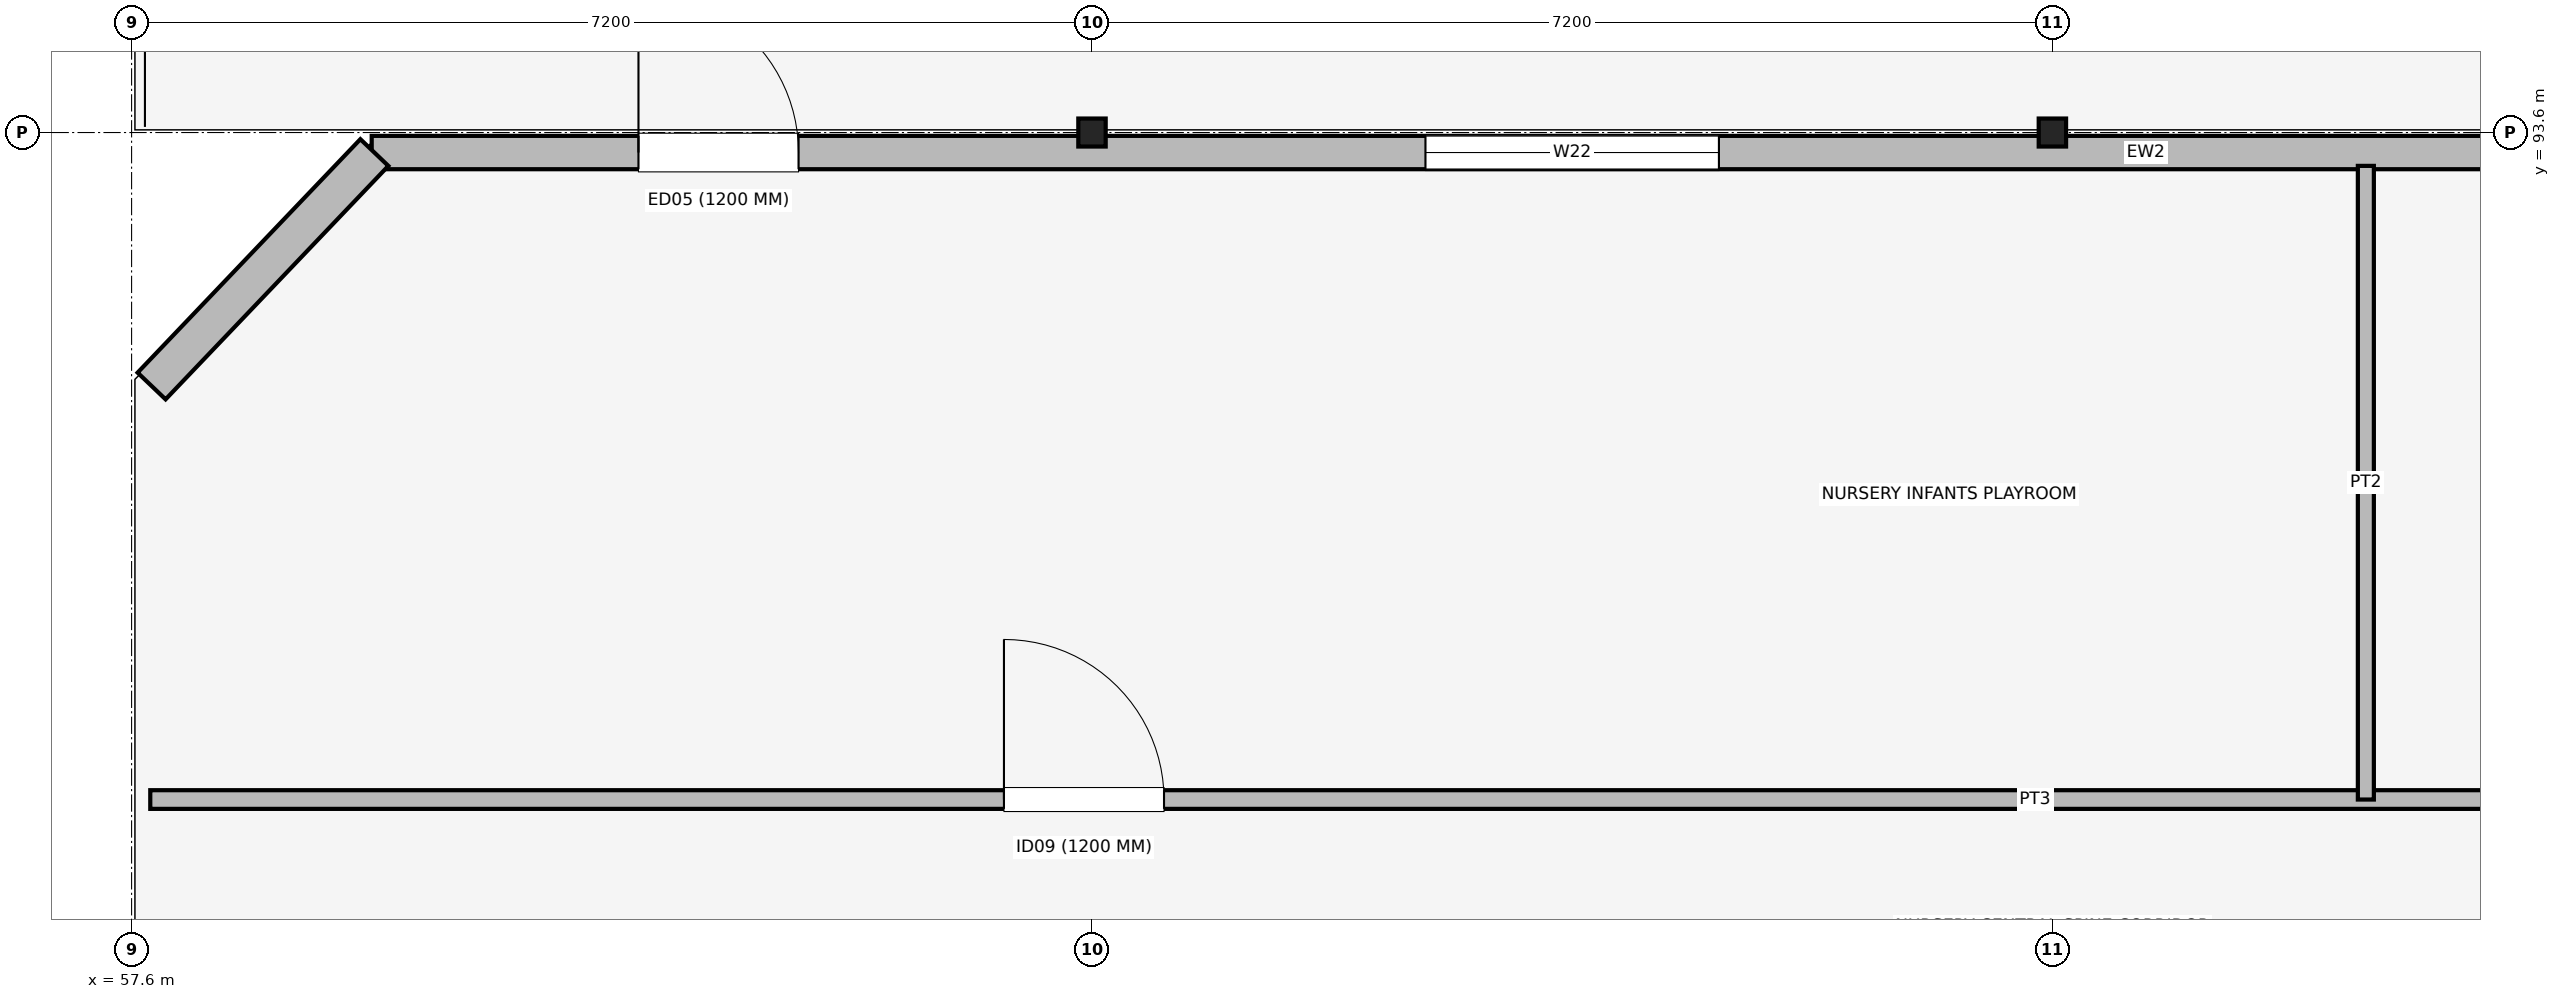
"""IFC4 building model, lengths in metres.
Left out: names, types, materials, properties, quantities, classifications, styles, units other than length and angle.
Written with IfcOpenShell. Run it as: python <this file> out.ifc"""

import sys

from ifc_helpers import new_model, si_unit, direction, frame, frame_2d, origin, origin_2d, place, context, subcontext, project, spatial, rectangle, i_section, extrude, element, fill, save


model = new_model("IFC4")
c1 = context("Model", 3, precision=1e-05, world=origin(), true_north=direction((0.0, 1.0)))
c2 = subcontext(c1, "Body", "Model", "MODEL_VIEW")
j1 = project(units=[si_unit("LENGTHUNIT", "METRE"), si_unit("PLANEANGLEUNIT", "RADIAN")], contexts=[c1])
p1 = place(None, origin())
s1 = spatial("IfcSite", under=j1, at=p1, CompositionType="ELEMENT")
p2 = place(p1, origin())
s2 = spatial("IfcBuilding", under=s1, at=p2, CompositionType="ELEMENT")
p3 = place(p2, frame((0.0, 0.0, 4.5)))
s3 = spatial("IfcBuildingStorey", under=s2, at=p3, CompositionType="ELEMENT", Elevation=4.5)
for number, where, z_axis, x_axis in (
    (1, (64.8, 93.6, 0.0), (0.0, 0.0, 1.0), (1.0, 0.0, 0.0)),
    (2, (72.0, 93.6, 0.0), (0.0, 0.0, 1.0), (1.0, 0.0, 0.0)),
):
    element("IfcColumn", number, at=place(p3, frame(where, z_axis=z_axis, x_axis=x_axis)), inside=s3, PredefinedType="COLUMN", context=c2, shape_type="SweptSolid", body=[
        extrude(i_section(OverallWidth=0.205, OverallDepth=0.21, WebThickness=0.009, FlangeThickness=0.014, FilletRadius=0.01, at=origin_2d()), origin(), (0.0, 0.0, 1.0), 4.2),
    ])
p4 = place(p3, frame((59.4, 93.45, 0.0), z_axis=(0.0, 0.0, 1.0), x_axis=(1.0, 0.0, 0.0)))
e3 = element("IfcWall", 3, at=p4, inside=s3, PredefinedType="SOLIDWALL", context=c2, shape_type="SweptSolid", body=[
    extrude(rectangle(XDim=46.8, YDim=0.25, at=frame_2d((23.4, 0.0))), origin(), (0.0, 0.0, 1.0), 3.448),
])
p5 = place(p4, frame((2.0, 0.0, 0.0)))
e4 = element("IfcOpeningElement", 4, at=p5, cuts=e3, PredefinedType="OPENING", context=c2, shape_type="SweptSolid", body=[
    extrude(rectangle(XDim=1.2, YDim=2.2, at=frame_2d((0.6, 1.1))), frame((0.0, 0.135, 0.0), z_axis=(0.0, -1.0, 0.0), x_axis=(1.0, 0.0, 0.0)), (0.0, 0.0, 1.0), 0.27),
])
p6 = place(p4, frame((7.9, 0.0, 0.65)))
e5 = element("IfcOpeningElement", 5, at=p6, cuts=e3, PredefinedType="OPENING", context=c2, shape_type="SweptSolid", body=[
    extrude(rectangle(XDim=2.2, YDim=2.05, at=frame_2d((1.1, 1.025))), frame((0.0, 0.135, 0.0), z_axis=(0.0, -1.0, 0.0), x_axis=(1.0, 0.0, 0.0)), (0.0, 0.0, 1.0), 0.27),
])
p7 = place(p4, frame((22.8, 0.0, 0.0)))
e6 = element("IfcOpeningElement", 6, at=p7, cuts=e3, PredefinedType="OPENING", context=c2, shape_type="SweptSolid", body=[
    extrude(rectangle(XDim=1.2, YDim=2.2, at=frame_2d((0.6, 1.1))), frame((0.0, 0.135, 0.0), z_axis=(0.0, -1.0, 0.0), x_axis=(1.0, 0.0, 0.0)), (0.0, 0.0, 1.0), 0.27),
])
p8 = place(p4, frame((17.0, 0.0, 0.65)))
e7 = element("IfcOpeningElement", 7, at=p8, cuts=e3, PredefinedType="OPENING", context=c2, shape_type="SweptSolid", body=[
    extrude(rectangle(XDim=2.2, YDim=2.05, at=frame_2d((1.1, 1.025))), frame((0.0, 0.135, 0.0), z_axis=(0.0, -1.0, 0.0), x_axis=(1.0, 0.0, 0.0)), (0.0, 0.0, 1.0), 0.27),
])
p9 = place(p4, frame((37.2, 0.0, 0.0)))
e8 = element("IfcOpeningElement", 8, at=p9, cuts=e3, PredefinedType="OPENING", context=c2, shape_type="SweptSolid", body=[
    extrude(rectangle(XDim=1.2, YDim=2.2, at=frame_2d((0.6, 1.1))), frame((0.0, 0.135, 0.0), z_axis=(0.0, -1.0, 0.0), x_axis=(1.0, 0.0, 0.0)), (0.0, 0.0, 1.0), 0.27),
])
p10 = place(p4, frame((42.5, 0.0, 0.65)))
e9 = element("IfcOpeningElement", 9, at=p10, cuts=e3, PredefinedType="OPENING", context=c2, shape_type="SweptSolid", body=[
    extrude(rectangle(XDim=2.6, YDim=2.05, at=frame_2d((1.3, 1.025))), frame((0.0, 0.135, 0.0), z_axis=(0.0, -1.0, 0.0), x_axis=(1.0, 0.0, 0.0)), (0.0, 0.0, 1.0), 0.27),
])
p11 = place(p3, frame((57.75, 91.7, 0.0), z_axis=(0.0, 0.0, 1.0), x_axis=(0.690360514167, 0.723465521279, 0.0)))
e10 = element("IfcWall", 10, at=p11, inside=s3, PredefinedType="SOLIDWALL", context=c2, shape_type="SweptSolid", body=[
    extrude(rectangle(XDim=2.419, YDim=0.29, at=frame_2d((1.209, 0.0))), origin(), (0.0, 0.0, 1.0), 3.55),
])
p12 = place(p3, frame((57.74, 88.6, 0.0), z_axis=(0.0, 0.0, 1.0), x_axis=(1.0, 0.0, 0.0)))
e11 = element("IfcWall", 11, at=p12, inside=s3, PredefinedType="PARTITIONING", context=c2, shape_type="SweptSolid", body=[
    extrude(rectangle(XDim=50.12, YDim=0.14, at=frame_2d((25.06, 0.0))), origin(), (0.0, 0.0, 1.0), 3.2),
])
p13 = place(p12, frame((6.4, 0.0, 0.0)))
e12 = element("IfcOpeningElement", 12, at=p13, cuts=e11, PredefinedType="OPENING", context=c2, shape_type="SweptSolid", body=[
    extrude(rectangle(XDim=1.2, YDim=2.18, at=frame_2d((0.6, 1.09))), frame((0.0, 0.08, 0.0), z_axis=(0.0, -1.0, 0.0), x_axis=(1.0, 0.0, 0.0)), (0.0, 0.0, 1.0), 0.16),
])
p14 = place(p12, frame((24.8, 0.0, 0.0), z_axis=(0.0, 0.0, 1.0), x_axis=(-1.0, 0.0, 0.0)))
e13 = element("IfcOpeningElement", 13, at=p14, cuts=e11, PredefinedType="OPENING", context=c2, shape_type="SweptSolid", body=[
    extrude(rectangle(XDim=1.2, YDim=2.18, at=frame_2d((0.6, 1.09))), frame((0.0, 0.08, 0.0), z_axis=(0.0, -1.0, 0.0), x_axis=(1.0, 0.0, 0.0)), (0.0, 0.0, 1.0), 0.16),
])
p15 = place(p12, frame((40.8, 0.0, 0.0)))
e14 = element("IfcOpeningElement", 14, at=p15, cuts=e11, PredefinedType="OPENING", context=c2, shape_type="SweptSolid", body=[
    extrude(rectangle(XDim=1.2, YDim=2.18, at=frame_2d((0.6, 1.09))), frame((0.0, 0.08, 0.0), z_axis=(0.0, -1.0, 0.0), x_axis=(1.0, 0.0, 0.0)), (0.0, 0.0, 1.0), 0.16),
])
p16 = place(p3, frame((74.35, 88.6, 0.0), z_axis=(0.0, 0.0, 1.0), x_axis=(0.0, 1.0, 0.0)))
e15 = element("IfcWall", 15, at=p16, inside=s3, PredefinedType="PARTITIONING", context=c2, shape_type="SweptSolid", body=[
    extrude(rectangle(XDim=4.75, YDim=0.12, at=frame_2d((2.375, 0.0))), origin(), (0.0, 0.0, 1.0), 3.2),
])
p17 = place(p5, origin())
e16 = element("IfcDoor", 16, at=p17, inside=s3, OperationType="SINGLE_SWING_LEFT", PredefinedType="DOOR", context=c2, shape_type="SweptSolid", body=[
    extrude(rectangle(XDim=1.2, YDim=2.2, at=frame_2d((0.6, 1.1))), frame((0.0, 0.025, 0.0), z_axis=(0.0, -1.0, 0.0), x_axis=(1.0, 0.0, 0.0)), (0.0, 0.0, 1.0), 0.05),
])
fill(e4, e16)
p18 = place(p6, origin())
e17 = element("IfcWindow", 17, at=p18, inside=s3, PartitioningType="SINGLE_PANEL", PredefinedType="WINDOW", context=c2, shape_type="SweptSolid", body=[
    extrude(rectangle(XDim=2.2, YDim=2.05, at=frame_2d((1.1, 1.025))), frame((0.0, 0.03, 0.0), z_axis=(0.0, -1.0, 0.0), x_axis=(1.0, 0.0, 0.0)), (0.0, 0.0, 1.0), 0.06),
])
fill(e5, e17)
p19 = place(p13, origin())
e18 = element("IfcDoor", 18, at=p19, inside=s3, OperationType="SINGLE_SWING_LEFT", PredefinedType="DOOR", context=c2, shape_type="SweptSolid", body=[
    extrude(rectangle(XDim=1.2, YDim=2.18, at=frame_2d((0.6, 1.09))), frame((0.0, 0.025, 0.0), z_axis=(0.0, -1.0, 0.0), x_axis=(1.0, 0.0, 0.0)), (0.0, 0.0, 1.0), 0.05),
])
fill(e12, e18)
save(model, sys.argv[1])
